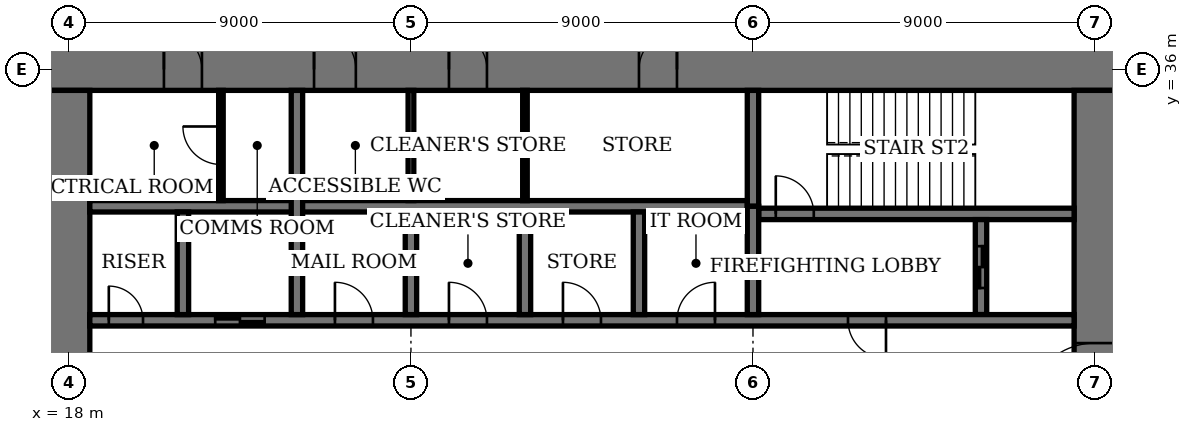
"""IFC4 building model, lengths in metres.
Left out: names, types, materials, properties, quantities, classifications, styles, units other than length and angle.
Written with IfcOpenShell. Run it as: python <this file> out.ifc"""

import sys

from ifc_helpers import new_model, si_unit, direction, frame, frame_2d, origin, place, context, subcontext, project, spatial, rectangle, extrude, element, fill, save


model = new_model("IFC4")
c1 = context("Model", 3, precision=1e-05, world=origin(), true_north=direction((0.0, 1.0)))
c2 = subcontext(c1, "Body", "Model", "MODEL_VIEW")
j1 = project(units=[si_unit("LENGTHUNIT", "METRE"), si_unit("PLANEANGLEUNIT", "RADIAN")], contexts=[c1])
p1 = place(None, origin())
s1 = spatial("IfcSite", under=j1, at=p1, CompositionType="ELEMENT")
p2 = place(p1, origin())
s2 = spatial("IfcBuilding", under=s1, at=p2, CompositionType="ELEMENT")
p3 = place(p2, frame((0.0, 0.0, 259.4)))
s3 = spatial("IfcBuildingStorey", under=s2, at=p3, CompositionType="ELEMENT", Elevation=259.4)
p4 = place(p3, frame((45.55, 36.0, 0.0), z_axis=(0.0, 0.0, 1.0), x_axis=(-1.0, 0.0, 0.0)))
e1 = element("IfcWall", 1, at=p4, inside=s3, PredefinedType="SHEAR", context=c2, shape_type="SweptSolid", body=[
    extrude(rectangle(XDim=28.1, YDim=1.1, at=frame_2d((14.05, 0.0))), origin(), (0.0, 0.0, 1.0), 4.0),
])
p5 = place(p4, frame((11.55, 0.0, 0.0)))
e2 = element("IfcOpeningElement", 2, at=p5, cuts=e1, PredefinedType="OPENING", context=c2, shape_type="SweptSolid", body=[
    extrude(rectangle(XDim=1.0, YDim=2.4, at=frame_2d((0.5, 1.2))), frame((0.0, 0.56, 0.0), z_axis=(0.0, -1.0, 0.0), x_axis=(1.0, 0.0, 0.0)), (0.0, 0.0, 1.0), 1.12),
])
p6 = place(p4, frame((16.55, 0.0, 0.0)))
e3 = element("IfcOpeningElement", 3, at=p6, cuts=e1, PredefinedType="OPENING", context=c2, shape_type="SweptSolid", body=[
    extrude(rectangle(XDim=1.0, YDim=2.4, at=frame_2d((0.5, 1.2))), frame((0.0, 0.56, 0.0), z_axis=(0.0, -1.0, 0.0), x_axis=(1.0, 0.0, 0.0)), (0.0, 0.0, 1.0), 1.12),
])
p7 = place(p4, frame((20.0, 0.0, 0.0)))
e4 = element("IfcOpeningElement", 4, at=p7, cuts=e1, PredefinedType="OPENING", context=c2, shape_type="SweptSolid", body=[
    extrude(rectangle(XDim=1.1, YDim=2.4, at=frame_2d((0.55, 1.2))), frame((0.0, 0.56, 0.0), z_axis=(0.0, -1.0, 0.0), x_axis=(1.0, 0.0, 0.0)), (0.0, 0.0, 1.0), 1.12),
])
p8 = place(p4, frame((24.05, 0.0, 0.0)))
e5 = element("IfcOpeningElement", 5, at=p8, cuts=e1, PredefinedType="OPENING", context=c2, shape_type="SweptSolid", body=[
    extrude(rectangle(XDim=1.0, YDim=2.4, at=frame_2d((0.5, 1.2))), frame((0.0, 0.56, 0.0), z_axis=(0.0, -1.0, 0.0), x_axis=(1.0, 0.0, 0.0)), (0.0, 0.0, 1.0), 1.12),
])
p9 = place(p3, frame((18.0, 35.45, 0.0), z_axis=(0.0, 0.0, 1.0), x_axis=(0.0, -1.0, 0.0)))
e6 = element("IfcWall", 6, at=p9, inside=s3, PredefinedType="SHEAR", context=c2, shape_type="SweptSolid", body=[
    extrude(rectangle(XDim=16.9, YDim=1.1, at=frame_2d((8.45, 0.0))), origin(), (0.0, 0.0, 1.0), 4.0),
])
p10 = place(p9, frame((8.45, 0.0, 0.0)))
e7 = element("IfcOpeningElement", 7, at=p10, cuts=e6, PredefinedType="OPENING", context=c2, shape_type="SweptSolid", body=[
    extrude(rectangle(XDim=1.8, YDim=2.4, at=frame_2d((0.9, 1.2))), frame((0.0, 0.56, 0.0), z_axis=(0.0, -1.0, 0.0), x_axis=(1.0, 0.0, 0.0)), (0.0, 0.0, 1.0), 1.12),
])
p11 = place(p3, frame((45.0, 18.55, 0.0), z_axis=(0.0, 0.0, 1.0), x_axis=(0.0, 1.0, 0.0)))
e8 = element("IfcWall", 8, at=p11, inside=s3, PredefinedType="SHEAR", context=c2, shape_type="SweptSolid", body=[
    extrude(rectangle(XDim=16.9, YDim=1.1, at=frame_2d((8.45, 0.0))), origin(), (0.0, 0.0, 1.0), 4.0),
])
p12 = place(p11, frame((8.45, 0.0, 0.0)))
e9 = element("IfcOpeningElement", 9, at=p12, cuts=e8, PredefinedType="OPENING", context=c2, shape_type="SweptSolid", body=[
    extrude(rectangle(XDim=1.8, YDim=2.4, at=frame_2d((0.9, 1.2))), frame((0.0, 0.56, 0.0), z_axis=(0.0, -1.0, 0.0), x_axis=(1.0, 0.0, 0.0)), (0.0, 0.0, 1.0), 1.12),
])
p13 = place(p3, frame((36.15, 32.2, 0.0), z_axis=(0.0, 0.0, 1.0), x_axis=(1.0, 0.0, 0.0)))
e10 = element("IfcWall", 10, at=p13, inside=s3, PredefinedType="SHEAR", context=c2, shape_type="SweptSolid", body=[
    extrude(rectangle(XDim=8.3, YDim=0.3, at=frame_2d((4.15, 0.0))), origin(), (0.0, 0.0, 1.0), 4.0),
])
p14 = place(p13, frame((0.45, 0.0, 0.0)))
e11 = element("IfcOpeningElement", 11, at=p14, cuts=e10, PredefinedType="OPENING", context=c2, shape_type="SweptSolid", body=[
    extrude(rectangle(XDim=1.0, YDim=2.4, at=frame_2d((0.5, 1.2))), frame((0.0, 0.16, 0.0), z_axis=(0.0, -1.0, 0.0), x_axis=(1.0, 0.0, 0.0)), (0.0, 0.0, 1.0), 0.32),
])
p15 = place(p3, frame((36.0, 32.4, 0.0), z_axis=(0.0, 0.0, 1.0), x_axis=(0.0, 1.0, 0.0)))
e12 = element("IfcWall", 12, at=p15, inside=s3, PredefinedType="SHEAR", context=c2, shape_type="SweptSolid", body=[
    extrude(rectangle(XDim=3.05, YDim=0.3, at=frame_2d((1.525, 0.0))), origin(), (0.0, 0.0, 1.0), 4.0),
])
p16 = place(p3, frame((42.0, 29.55, 0.0), z_axis=(0.0, 0.0, 1.0), x_axis=(0.0, 1.0, 0.0)))
e13 = element("IfcWall", 13, at=p16, inside=s3, PredefinedType="SHEAR", context=c2, shape_type="SweptSolid", body=[
    extrude(rectangle(XDim=2.5, YDim=0.3, at=frame_2d((1.25, 0.0))), origin(), (0.0, 0.0, 1.0), 4.0),
])
p17 = place(p16, frame((0.7, 0.0, 0.0)))
e14 = element("IfcOpeningElement", 14, at=p17, cuts=e13, PredefinedType="OPENING", context=c2, shape_type="SweptSolid", body=[
    extrude(rectangle(XDim=1.1, YDim=2.4, at=frame_2d((0.55, 1.2))), frame((0.0, 0.16, 0.0), z_axis=(0.0, -1.0, 0.0), x_axis=(1.0, 0.0, 0.0)), (0.0, 0.0, 1.0), 0.32),
])
p18 = place(p3, frame((18.55, 29.4, 0.0), z_axis=(0.0, 0.0, 1.0), x_axis=(1.0, 0.0, 0.0)))
e15 = element("IfcWall", 15, at=p18, inside=s3, PredefinedType="SHEAR", context=c2, shape_type="SweptSolid", body=[
    extrude(rectangle(XDim=25.9, YDim=0.3, at=frame_2d((12.95, 0.0))), origin(), (0.0, 0.0, 1.0), 4.0),
])
p19 = place(p18, frame((19.95, 0.0, 0.0)))
e16 = element("IfcOpeningElement", 16, at=p19, cuts=e15, PredefinedType="OPENING", context=c2, shape_type="SweptSolid", body=[
    extrude(rectangle(XDim=1.0, YDim=2.4, at=frame_2d((0.5, 1.2))), frame((0.0, 0.16, 0.0), z_axis=(0.0, -1.0, 0.0), x_axis=(1.0, 0.0, 0.0)), (0.0, 0.0, 1.0), 0.32),
])
p20 = place(p18, frame((0.5, 0.0, 0.0)))
e17 = element("IfcOpeningElement", 17, at=p20, cuts=e15, PredefinedType="OPENING", context=c2, shape_type="SweptSolid", body=[
    extrude(rectangle(XDim=0.9, YDim=2.1, at=frame_2d((0.45, 1.05))), frame((0.0, 0.16, 0.0), z_axis=(0.0, -1.0, 0.0), x_axis=(1.0, 0.0, 0.0)), (0.0, 0.0, 1.0), 0.32),
])
p21 = place(p18, frame((15.45, 0.0, 0.0)))
e18 = element("IfcOpeningElement", 18, at=p21, cuts=e15, PredefinedType="OPENING", context=c2, shape_type="SweptSolid", body=[
    extrude(rectangle(XDim=1.0, YDim=2.4, at=frame_2d((0.5, 1.2))), frame((0.0, 0.16, 0.0), z_axis=(0.0, -1.0, 0.0), x_axis=(1.0, 0.0, 0.0)), (0.0, 0.0, 1.0), 0.32),
])
p22 = place(p18, frame((12.45, 0.0, 0.0)))
e19 = element("IfcOpeningElement", 19, at=p22, cuts=e15, PredefinedType="OPENING", context=c2, shape_type="SweptSolid", body=[
    extrude(rectangle(XDim=1.0, YDim=2.4, at=frame_2d((0.5, 1.2))), frame((0.0, 0.16, 0.0), z_axis=(0.0, -1.0, 0.0), x_axis=(1.0, 0.0, 0.0)), (0.0, 0.0, 1.0), 0.32),
])
p23 = place(p18, frame((9.45, 0.0, 0.0)))
e20 = element("IfcOpeningElement", 20, at=p23, cuts=e15, PredefinedType="OPENING", context=c2, shape_type="SweptSolid", body=[
    extrude(rectangle(XDim=1.0, YDim=2.4, at=frame_2d((0.5, 1.2))), frame((0.0, 0.16, 0.0), z_axis=(0.0, -1.0, 0.0), x_axis=(1.0, 0.0, 0.0)), (0.0, 0.0, 1.0), 0.32),
])
p24 = place(p18, frame((6.45, 0.0, 0.0)))
e21 = element("IfcOpeningElement", 21, at=p24, cuts=e15, PredefinedType="OPENING", context=c2, shape_type="SweptSolid", body=[
    extrude(rectangle(XDim=1.0, YDim=2.4, at=frame_2d((0.5, 1.2))), frame((0.0, 0.16, 0.0), z_axis=(0.0, -1.0, 0.0), x_axis=(1.0, 0.0, 0.0)), (0.0, 0.0, 1.0), 0.32),
])
p25 = place(p18, frame((3.3, 0.0, 0.0)))
e22 = element("IfcOpeningElement", 22, at=p25, cuts=e15, PredefinedType="OPENING", context=c2, shape_type="SweptSolid", body=[
    extrude(rectangle(XDim=1.3, YDim=2.4, at=frame_2d((0.65, 1.2))), frame((0.0, 0.16, 0.0), z_axis=(0.0, -1.0, 0.0), x_axis=(1.0, 0.0, 0.0)), (0.0, 0.0, 1.0), 0.32),
])
p26 = place(p3, frame((18.55, 32.4, 0.0), z_axis=(0.0, 0.0, 1.0), x_axis=(1.0, 0.0, 0.0)))
e23 = element("IfcWall", 23, at=p26, inside=s3, PredefinedType="SHEAR", context=c2, shape_type="SweptSolid", body=[
    extrude(rectangle(XDim=17.3, YDim=0.3, at=frame_2d((8.65, 0.0))), origin(), (0.0, 0.0, 1.0), 4.0),
])
for number, where, z_axis, x_axis in (
    (24, (33.0, 29.55, 0.0), (0.0, 0.0, 1.0), (0.0, 1.0, 0.0)),
    (25, (30.0, 29.55, 0.0), (0.0, 0.0, 1.0), (0.0, 1.0, 0.0)),
    (26, (27.0, 29.55, 0.0), (0.0, 0.0, 1.0), (0.0, 1.0, 0.0)),
):
    element("IfcWall", number, at=place(p3, frame(where, z_axis=z_axis, x_axis=x_axis)), inside=s3, PredefinedType="SHEAR", context=c2, shape_type="SweptSolid", body=[
        extrude(rectangle(XDim=2.7, YDim=0.3, at=frame_2d((1.35, 0.0))), origin(), (0.0, 0.0, 1.0), 4.0),
    ])
p27 = place(p3, frame((24.0, 29.55, 0.0), z_axis=(0.0, 0.0, 1.0), x_axis=(0.0, 1.0, 0.0)))
e27 = element("IfcWall", 27, at=p27, inside=s3, PredefinedType="SHEAR", context=c2, shape_type="SweptSolid", body=[
    extrude(rectangle(XDim=5.9, YDim=0.3, at=frame_2d((2.95, 0.0))), origin(), (0.0, 0.0, 1.0), 4.0),
])
p28 = place(p3, frame((21.0, 29.55, 0.0), z_axis=(0.0, 0.0, 1.0), x_axis=(0.0, 1.0, 0.0)))
e28 = element("IfcWall", 28, at=p28, inside=s3, PredefinedType="SHEAR", context=c2, shape_type="SweptSolid", body=[
    extrude(rectangle(XDim=2.7, YDim=0.3, at=frame_2d((1.35, 0.0))), origin(), (0.0, 0.0, 1.0), 4.0),
])
p29 = place(p3, frame((36.0, 29.55, 0.0), z_axis=(0.0, 0.0, 1.0), x_axis=(0.0, 1.0, 0.0)))
e29 = element("IfcWall", 29, at=p29, inside=s3, PredefinedType="SHEAR", context=c2, shape_type="SweptSolid", body=[
    extrude(rectangle(XDim=2.85, YDim=0.3, at=frame_2d((1.425, 0.0))), origin(), (0.0, 0.0, 1.0), 4.0),
])
p30 = place(p3, frame((30.0, 32.55, 0.0), z_axis=(0.0, 0.0, 1.0), x_axis=(0.0, 1.0, 0.0)))
e30 = element("IfcWall", 30, at=p30, inside=s3, PredefinedType="PARTITIONING", context=c2, shape_type="SweptSolid", body=[
    extrude(rectangle(XDim=2.9, YDim=0.12, at=frame_2d((1.45, 0.0))), origin(), (0.0, 0.0, 1.0), 3.75),
])
p31 = place(p3, frame((27.0, 32.55, 0.0), z_axis=(0.0, 0.0, 1.0), x_axis=(0.0, 1.0, 0.0)))
e31 = element("IfcWall", 31, at=p31, inside=s3, PredefinedType="PARTITIONING", context=c2, shape_type="SweptSolid", body=[
    extrude(rectangle(XDim=2.9, YDim=0.15, at=frame_2d((1.45, 0.0))), origin(), (0.0, 0.0, 1.0), 3.75),
])
p32 = place(p3, frame((22.0, 32.55, 0.0), z_axis=(0.0, 0.0, 1.0), x_axis=(0.0, 1.0, 0.0)))
e32 = element("IfcWall", 32, at=p32, inside=s3, PredefinedType="PARTITIONING", context=c2, shape_type="SweptSolid", body=[
    extrude(rectangle(XDim=2.9, YDim=0.12, at=frame_2d((1.45, 0.0))), origin(), (0.0, 0.0, 1.0), 3.75),
])
p33 = place(p32, frame((0.95, 0.0, 0.0)))
e33 = element("IfcOpeningElement", 33, at=p33, cuts=e32, PredefinedType="OPENING", context=c2, shape_type="SweptSolid", body=[
    extrude(rectangle(XDim=1.0, YDim=2.4, at=frame_2d((0.5, 1.2))), frame((0.0, 0.07, 0.0), z_axis=(0.0, -1.0, 0.0), x_axis=(1.0, 0.0, 0.0)), (0.0, 0.0, 1.0), 0.14),
])
p34 = place(p12, origin())
e34 = element("IfcDoor", 34, at=p34, inside=s3, OperationType="DOUBLE_DOOR_DOUBLE_SWING", PredefinedType="DOOR", context=c2, shape_type="SweptSolid", body=[
    extrude(rectangle(XDim=1.8, YDim=2.4, at=frame_2d((0.9, 1.2))), frame((0.0, 0.03, 0.0), z_axis=(0.0, -1.0, 0.0), x_axis=(1.0, 0.0, 0.0)), (0.0, 0.0, 1.0), 0.06),
    extrude(rectangle(XDim=0.04, YDim=2.4, at=frame_2d((0.02, 1.2))), frame((0.0, 0.55, 0.0), z_axis=(0.0, -1.0, 0.0), x_axis=(1.0, 0.0, 0.0)), (0.0, 0.0, 1.0), 1.1),
    extrude(rectangle(XDim=0.04, YDim=2.4, at=frame_2d((1.78, 1.2))), frame((0.0, 0.55, 0.0), z_axis=(0.0, -1.0, 0.0), x_axis=(1.0, 0.0, 0.0)), (0.0, 0.0, 1.0), 1.1),
    extrude(rectangle(XDim=1.8, YDim=0.04, at=frame_2d((0.9, 2.38))), frame((0.0, 0.55, 0.0), z_axis=(0.0, -1.0, 0.0), x_axis=(1.0, 0.0, 0.0)), (0.0, 0.0, 1.0), 1.1),
])
fill(e9, e34)
p35 = place(p5, origin())
e35 = element("IfcDoor", 35, at=p35, inside=s3, OperationType="SINGLE_SWING_LEFT", PredefinedType="DOOR", context=c2, shape_type="SweptSolid", body=[
    extrude(rectangle(XDim=1.0, YDim=2.4, at=frame_2d((0.5, 1.2))), frame((0.0, 0.025, 0.0), z_axis=(0.0, -1.0, 0.0), x_axis=(1.0, 0.0, 0.0)), (0.0, 0.0, 1.0), 0.05),
    extrude(rectangle(XDim=0.04, YDim=2.4, at=frame_2d((0.02, 1.2))), frame((0.0, 0.4, 0.0), z_axis=(0.0, -1.0, 0.0), x_axis=(1.0, 0.0, 0.0)), (0.0, 0.0, 1.0), 0.8),
    extrude(rectangle(XDim=0.04, YDim=2.4, at=frame_2d((0.98, 1.2))), frame((0.0, 0.4, 0.0), z_axis=(0.0, -1.0, 0.0), x_axis=(1.0, 0.0, 0.0)), (0.0, 0.0, 1.0), 0.8),
    extrude(rectangle(XDim=1.0, YDim=0.04, at=frame_2d((0.5, 2.38))), frame((0.0, 0.4, 0.0), z_axis=(0.0, -1.0, 0.0), x_axis=(1.0, 0.0, 0.0)), (0.0, 0.0, 1.0), 0.8),
])
fill(e2, e35)
p36 = place(p6, origin())
e36 = element("IfcDoor", 36, at=p36, inside=s3, OperationType="SINGLE_SWING_RIGHT", PredefinedType="DOOR", context=c2, shape_type="SweptSolid", body=[
    extrude(rectangle(XDim=1.0, YDim=2.4, at=frame_2d((0.5, 1.2))), frame((0.0, 0.025, 0.0), z_axis=(0.0, -1.0, 0.0), x_axis=(1.0, 0.0, 0.0)), (0.0, 0.0, 1.0), 0.05),
    extrude(rectangle(XDim=0.04, YDim=2.4, at=frame_2d((0.02, 1.2))), frame((0.0, 0.4, 0.0), z_axis=(0.0, -1.0, 0.0), x_axis=(1.0, 0.0, 0.0)), (0.0, 0.0, 1.0), 0.8),
    extrude(rectangle(XDim=0.04, YDim=2.4, at=frame_2d((0.98, 1.2))), frame((0.0, 0.4, 0.0), z_axis=(0.0, -1.0, 0.0), x_axis=(1.0, 0.0, 0.0)), (0.0, 0.0, 1.0), 0.8),
    extrude(rectangle(XDim=1.0, YDim=0.04, at=frame_2d((0.5, 2.38))), frame((0.0, 0.4, 0.0), z_axis=(0.0, -1.0, 0.0), x_axis=(1.0, 0.0, 0.0)), (0.0, 0.0, 1.0), 0.8),
])
fill(e3, e36)
p37 = place(p7, origin())
e37 = element("IfcDoor", 37, at=p37, inside=s3, OperationType="SINGLE_SWING_RIGHT", PredefinedType="DOOR", context=c2, shape_type="SweptSolid", body=[
    extrude(rectangle(XDim=1.1, YDim=2.4, at=frame_2d((0.55, 1.2))), frame((0.0, 0.025, 0.0), z_axis=(0.0, -1.0, 0.0), x_axis=(1.0, 0.0, 0.0)), (0.0, 0.0, 1.0), 0.05),
    extrude(rectangle(XDim=0.04, YDim=2.4, at=frame_2d((0.02, 1.2))), frame((0.0, 0.44, 0.0), z_axis=(0.0, -1.0, 0.0), x_axis=(1.0, 0.0, 0.0)), (0.0, 0.0, 1.0), 0.88),
    extrude(rectangle(XDim=0.04, YDim=2.4, at=frame_2d((1.08, 1.2))), frame((0.0, 0.44, 0.0), z_axis=(0.0, -1.0, 0.0), x_axis=(1.0, 0.0, 0.0)), (0.0, 0.0, 1.0), 0.88),
    extrude(rectangle(XDim=1.1, YDim=0.04, at=frame_2d((0.55, 2.38))), frame((0.0, 0.44, 0.0), z_axis=(0.0, -1.0, 0.0), x_axis=(1.0, 0.0, 0.0)), (0.0, 0.0, 1.0), 0.88),
])
fill(e4, e37)
p38 = place(p8, origin())
e38 = element("IfcDoor", 38, at=p38, inside=s3, OperationType="SINGLE_SWING_RIGHT", PredefinedType="DOOR", context=c2, shape_type="SweptSolid", body=[
    extrude(rectangle(XDim=1.0, YDim=2.4, at=frame_2d((0.5, 1.2))), frame((0.0, 0.025, 0.0), z_axis=(0.0, -1.0, 0.0), x_axis=(1.0, 0.0, 0.0)), (0.0, 0.0, 1.0), 0.05),
    extrude(rectangle(XDim=0.04, YDim=2.4, at=frame_2d((0.02, 1.2))), frame((0.0, 0.4, 0.0), z_axis=(0.0, -1.0, 0.0), x_axis=(1.0, 0.0, 0.0)), (0.0, 0.0, 1.0), 0.8),
    extrude(rectangle(XDim=0.04, YDim=2.4, at=frame_2d((0.98, 1.2))), frame((0.0, 0.4, 0.0), z_axis=(0.0, -1.0, 0.0), x_axis=(1.0, 0.0, 0.0)), (0.0, 0.0, 1.0), 0.8),
    extrude(rectangle(XDim=1.0, YDim=0.04, at=frame_2d((0.5, 2.38))), frame((0.0, 0.4, 0.0), z_axis=(0.0, -1.0, 0.0), x_axis=(1.0, 0.0, 0.0)), (0.0, 0.0, 1.0), 0.8),
])
fill(e5, e38)
p39 = place(p14, origin())
e39 = element("IfcDoor", 39, at=p39, inside=s3, OperationType="SINGLE_SWING_RIGHT", PredefinedType="DOOR", context=c2, shape_type="SweptSolid", body=[
    extrude(rectangle(XDim=1.0, YDim=2.4, at=frame_2d((0.5, 1.2))), frame((0.0, 0.03, 0.0), z_axis=(0.0, -1.0, 0.0), x_axis=(1.0, 0.0, 0.0)), (0.0, 0.0, 1.0), 0.06),
])
fill(e11, e39)
p40 = place(p19, origin())
e40 = element("IfcDoor", 40, at=p40, inside=s3, OperationType="SINGLE_SWING_RIGHT", PredefinedType="DOOR", context=c2, shape_type="SweptSolid", body=[
    extrude(rectangle(XDim=1.0, YDim=2.4, at=frame_2d((0.5, 1.2))), frame((0.0, 0.03, 0.0), z_axis=(0.0, -1.0, 0.0), x_axis=(1.0, 0.0, 0.0)), (0.0, 0.0, 1.0), 0.06),
])
fill(e16, e40)
p41 = place(p20, origin())
e41 = element("IfcDoor", 41, at=p41, inside=s3, OperationType="SINGLE_SWING_RIGHT", PredefinedType="DOOR", context=c2, shape_type="SweptSolid", body=[
    extrude(rectangle(XDim=0.9, YDim=2.1, at=frame_2d((0.45, 1.05))), frame((0.0, 0.03, 0.0), z_axis=(0.0, -1.0, 0.0), x_axis=(1.0, 0.0, 0.0)), (0.0, 0.0, 1.0), 0.06),
])
fill(e17, e41)
p42 = place(p33, origin())
e42 = element("IfcDoor", 42, at=p42, inside=s3, OperationType="SINGLE_SWING_LEFT", PredefinedType="DOOR", context=c2, shape_type="SweptSolid", body=[
    extrude(rectangle(XDim=1.0, YDim=2.4, at=frame_2d((0.5, 1.2))), frame((0.0, 0.03, 0.0), z_axis=(0.0, -1.0, 0.0), x_axis=(1.0, 0.0, 0.0)), (0.0, 0.0, 1.0), 0.06),
])
fill(e33, e42)
p43 = place(p21, origin())
e43 = element("IfcDoor", 43, at=p43, inside=s3, OperationType="SINGLE_SWING_LEFT", PredefinedType="DOOR", context=c2, shape_type="SweptSolid", body=[
    extrude(rectangle(XDim=1.0, YDim=2.4, at=frame_2d((0.5, 1.2))), frame((0.0, 0.03, 0.0), z_axis=(0.0, -1.0, 0.0), x_axis=(1.0, 0.0, 0.0)), (0.0, 0.0, 1.0), 0.06),
])
fill(e18, e43)
p44 = place(p22, origin())
e44 = element("IfcDoor", 44, at=p44, inside=s3, OperationType="SINGLE_SWING_RIGHT", PredefinedType="DOOR", context=c2, shape_type="SweptSolid", body=[
    extrude(rectangle(XDim=1.0, YDim=2.4, at=frame_2d((0.5, 1.2))), frame((0.0, 0.03, 0.0), z_axis=(0.0, -1.0, 0.0), x_axis=(1.0, 0.0, 0.0)), (0.0, 0.0, 1.0), 0.06),
])
fill(e19, e44)
p45 = place(p23, origin())
e45 = element("IfcDoor", 45, at=p45, inside=s3, OperationType="SINGLE_SWING_RIGHT", PredefinedType="DOOR", context=c2, shape_type="SweptSolid", body=[
    extrude(rectangle(XDim=1.0, YDim=2.4, at=frame_2d((0.5, 1.2))), frame((0.0, 0.03, 0.0), z_axis=(0.0, -1.0, 0.0), x_axis=(1.0, 0.0, 0.0)), (0.0, 0.0, 1.0), 0.06),
])
fill(e20, e45)
p46 = place(p24, origin())
e46 = element("IfcDoor", 46, at=p46, inside=s3, OperationType="SINGLE_SWING_RIGHT", PredefinedType="DOOR", context=c2, shape_type="SweptSolid", body=[
    extrude(rectangle(XDim=1.0, YDim=2.4, at=frame_2d((0.5, 1.2))), frame((0.0, 0.03, 0.0), z_axis=(0.0, -1.0, 0.0), x_axis=(1.0, 0.0, 0.0)), (0.0, 0.0, 1.0), 0.06),
])
fill(e21, e46)
p47 = place(p25, origin())
e47 = element("IfcDoor", 47, at=p47, inside=s3, OperationType="DOUBLE_DOOR_SLIDING", PredefinedType="DOOR", context=c2, shape_type="SweptSolid", body=[
    extrude(rectangle(XDim=1.3, YDim=2.4, at=frame_2d((0.65, 1.2))), frame((0.0, 0.02, 0.0), z_axis=(0.0, -1.0, 0.0), x_axis=(1.0, 0.0, 0.0)), (0.0, 0.0, 1.0), 0.04),
])
fill(e22, e47)
p48 = place(p17, origin())
e48 = element("IfcDoor", 48, at=p48, inside=s3, OperationType="DOUBLE_DOOR_SLIDING", PredefinedType="DOOR", context=c2, shape_type="SweptSolid", body=[
    extrude(rectangle(XDim=1.1, YDim=2.4, at=frame_2d((0.55, 1.2))), frame((0.0, 0.03, 0.0), z_axis=(0.0, -1.0, 0.0), x_axis=(1.0, 0.0, 0.0)), (0.0, 0.0, 1.0), 0.06),
])
fill(e14, e48)
save(model, sys.argv[1])
